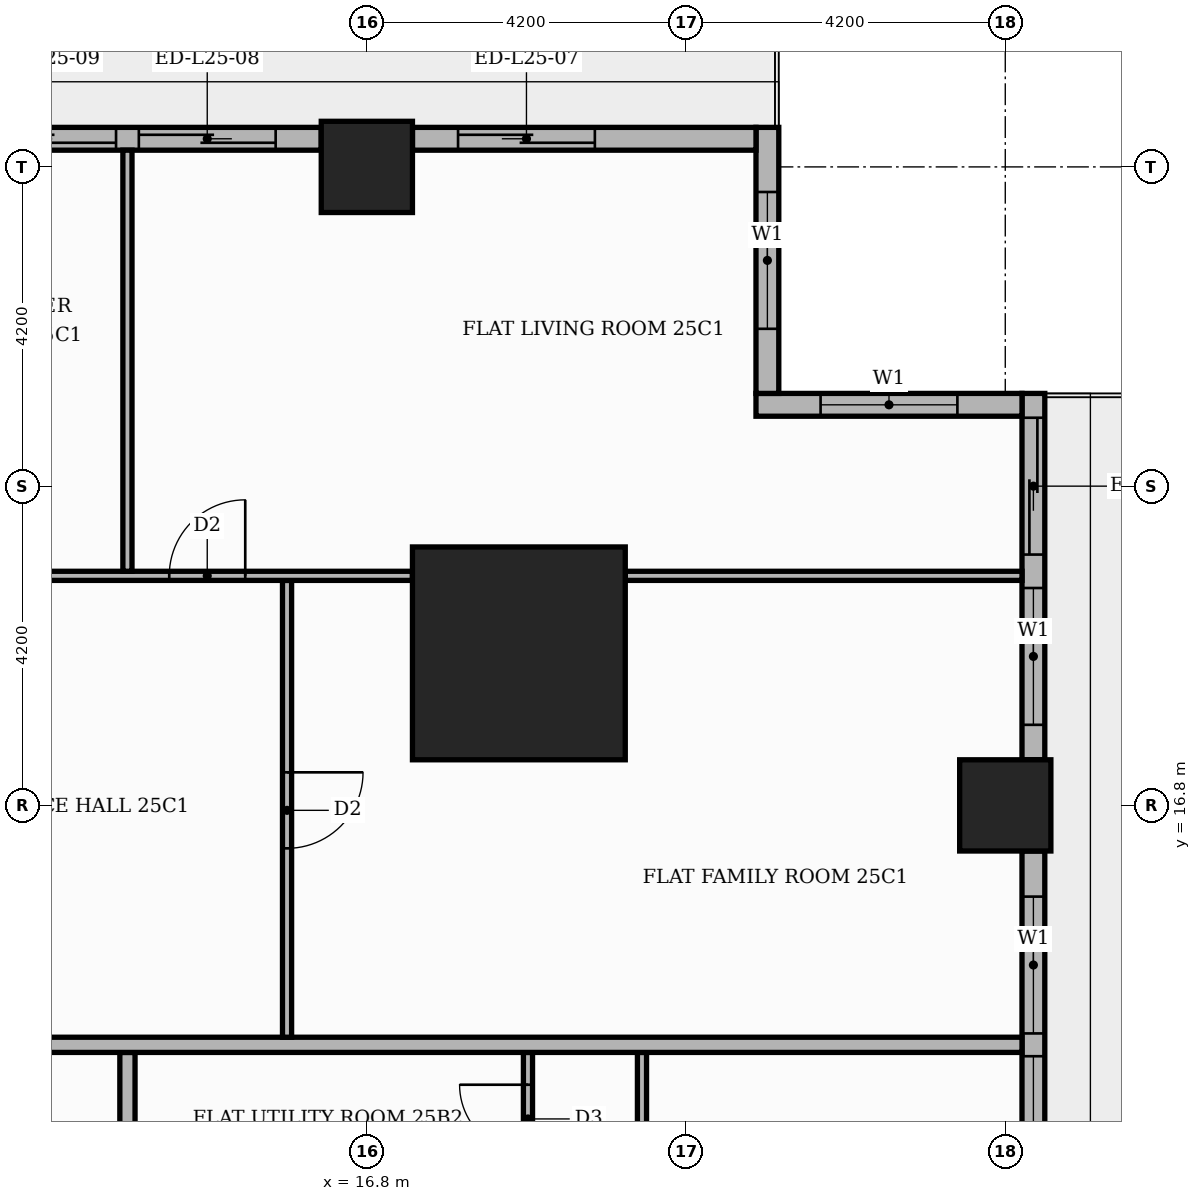
"""IFC4 building model, lengths in metres.
Left out: names, types, materials, properties, quantities, classifications, styles, units other than length and angle.
Written with IfcOpenShell. Run it as: python <this file> out.ifc"""

import sys

from ifc_helpers import new_model, si_unit, direction, frame, frame_2d, origin, origin_2d, place, context, subcontext, project, spatial, rectangle, extrude, element, fill, save


model = new_model("IFC4")
c1 = context("Model", 3, precision=1e-05, world=origin(), true_north=direction((0.0, 1.0)))
c2 = subcontext(c1, "Body", "Model", "MODEL_VIEW")
j1 = project(units=[si_unit("LENGTHUNIT", "METRE"), si_unit("PLANEANGLEUNIT", "RADIAN")], contexts=[c1])
p1 = place(None, origin())
s1 = spatial("IfcSite", under=j1, at=p1, CompositionType="ELEMENT")
p2 = place(p1, origin())
s2 = spatial("IfcBuilding", under=s1, at=p2, CompositionType="ELEMENT")
p3 = place(p2, frame((0.0, 0.0, 106.5)))
s3 = spatial("IfcBuildingStorey", under=s2, at=p3, CompositionType="ELEMENT", Elevation=106.5)
p4 = place(p3, frame((18.8, 18.8, 0.0), z_axis=(0.0, 0.0, 1.0), x_axis=(1.0, 0.0, 0.0)))
e1 = element("IfcColumn", 1, at=p4, inside=s3, PredefinedType="COLUMN", context=c2, shape_type="SweptSolid", body=[
    extrude(rectangle(XDim=2.8, YDim=2.8, at=origin_2d()), origin(), (0.0, 0.0, 1.0), 3.9),
])
for number, where, z_axis, x_axis in (
    (2, (25.2, 16.8, 0.0), (0.0, 0.0, 1.0), (1.0, 0.0, 0.0)),
    (3, (16.8, 25.2, 0.0), (0.0, 0.0, 1.0), (1.0, 0.0, 0.0)),
):
    element("IfcColumn", number, at=place(p3, frame(where, z_axis=z_axis, x_axis=x_axis)), inside=s3, PredefinedType="COLUMN", context=c2, shape_type="SweptSolid", body=[
        extrude(rectangle(XDim=1.2, YDim=1.2, at=origin_2d()), origin(), (0.0, 0.0, 1.0), 3.9),
    ])
p5 = place(p3, frame((25.57, 9.0, 0.0), z_axis=(0.0, 0.0, 1.0), x_axis=(0.0, 1.0, 0.0)))
e4 = element("IfcWall", 4, at=p5, inside=s3, PredefinedType="STANDARD", context=c2, shape_type="SweptSolid", body=[
    extrude(rectangle(XDim=7.2, YDim=0.3, at=frame_2d((3.6, 0.0))), origin(), (0.0, 0.0, 1.0), 3.48),
])
p6 = place(p5, frame((0.6, 0.0, 0.9)))
e5 = element("IfcOpeningElement", 5, at=p6, cuts=e4, PredefinedType="OPENING", context=c2, shape_type="SweptSolid", body=[
    extrude(rectangle(XDim=3.9, YDim=2.1, at=frame_2d((1.95, 1.05))), frame((0.0, 0.16, 0.0), z_axis=(0.0, -1.0, 0.0), x_axis=(1.0, 0.0, 0.0)), (0.0, 0.0, 1.0), 0.32),
])
p7 = place(p5, frame((4.8, 0.0, 0.9)))
e6 = element("IfcOpeningElement", 6, at=p7, cuts=e4, PredefinedType="OPENING", context=c2, shape_type="SweptSolid", body=[
    extrude(rectangle(XDim=1.8, YDim=2.1, at=frame_2d((0.9, 1.05))), frame((0.0, 0.16, 0.0), z_axis=(0.0, -1.0, 0.0), x_axis=(1.0, 0.0, 0.0)), (0.0, 0.0, 1.0), 0.32),
])
p8 = place(p3, frame((25.57, 17.4, 0.0), z_axis=(0.0, 0.0, 1.0), x_axis=(0.0, 1.0, 0.0)))
e7 = element("IfcWall", 7, at=p8, inside=s3, PredefinedType="STANDARD", context=c2, shape_type="SweptSolid", body=[
    extrude(rectangle(XDim=4.82, YDim=0.3, at=frame_2d((2.41, 0.0))), origin(), (0.0, 0.0, 1.0), 3.48),
])
p9 = place(p8, frame((2.7, 0.0, 0.0)))
e8 = element("IfcOpeningElement", 8, at=p9, cuts=e7, PredefinedType="OPENING", context=c2, shape_type="SweptSolid", body=[
    extrude(rectangle(XDim=1.8, YDim=2.4, at=frame_2d((0.9, 1.2))), frame((0.0, 0.16, 0.0), z_axis=(0.0, -1.0, 0.0), x_axis=(1.0, 0.0, 0.0)), (0.0, 0.0, 1.0), 0.32),
])
p10 = place(p8, frame((0.46, 0.0, 0.9)))
e9 = element("IfcOpeningElement", 9, at=p10, cuts=e7, PredefinedType="OPENING", context=c2, shape_type="SweptSolid", body=[
    extrude(rectangle(XDim=1.8, YDim=2.1, at=frame_2d((0.9, 1.05))), frame((0.0, 0.16, 0.0), z_axis=(0.0, -1.0, 0.0), x_axis=(1.0, 0.0, 0.0)), (0.0, 0.0, 1.0), 0.32),
])
p11 = place(p3, frame((25.42, 22.07, 0.0), z_axis=(0.0, 0.0, 1.0), x_axis=(-1.0, 0.0, 0.0)))
e10 = element("IfcWall", 10, at=p11, inside=s3, PredefinedType="STANDARD", context=c2, shape_type="SweptSolid", body=[
    extrude(rectangle(XDim=3.5, YDim=0.3, at=frame_2d((1.75, 0.0))), origin(), (0.0, 0.0, 1.0), 3.48),
])
p12 = place(p11, frame((0.85, 0.0, 0.9)))
e11 = element("IfcOpeningElement", 11, at=p12, cuts=e10, PredefinedType="OPENING", context=c2, shape_type="SweptSolid", body=[
    extrude(rectangle(XDim=1.8, YDim=2.1, at=frame_2d((0.9, 1.05))), frame((0.0, 0.16, 0.0), z_axis=(0.0, -1.0, 0.0), x_axis=(1.0, 0.0, 0.0)), (0.0, 0.0, 1.0), 0.32),
])
p13 = place(p3, frame((22.07, 22.22, 0.0), z_axis=(0.0, 0.0, 1.0), x_axis=(0.0, 1.0, 0.0)))
e12 = element("IfcWall", 12, at=p13, inside=s3, PredefinedType="STANDARD", context=c2, shape_type="SweptSolid", body=[
    extrude(rectangle(XDim=3.5, YDim=0.3, at=frame_2d((1.75, 0.0))), origin(), (0.0, 0.0, 1.0), 3.48),
])
p14 = place(p13, frame((0.85, 0.0, 0.9)))
e13 = element("IfcOpeningElement", 13, at=p14, cuts=e12, PredefinedType="OPENING", context=c2, shape_type="SweptSolid", body=[
    extrude(rectangle(XDim=1.8, YDim=2.1, at=frame_2d((0.9, 1.05))), frame((0.0, 0.16, 0.0), z_axis=(0.0, -1.0, 0.0), x_axis=(1.0, 0.0, 0.0)), (0.0, 0.0, 1.0), 0.32),
])
p15 = place(p3, frame((21.92, 25.57, 0.0), z_axis=(0.0, 0.0, 1.0), x_axis=(-1.0, 0.0, 0.0)))
e14 = element("IfcWall", 14, at=p15, inside=s3, PredefinedType="STANDARD", context=c2, shape_type="SweptSolid", body=[
    extrude(rectangle(XDim=4.52, YDim=0.3, at=frame_2d((2.26, 0.0))), origin(), (0.0, 0.0, 1.0), 3.48),
])
p16 = place(p15, frame((2.12, 0.0, 0.0)))
e15 = element("IfcOpeningElement", 15, at=p16, cuts=e14, PredefinedType="OPENING", context=c2, shape_type="SweptSolid", body=[
    extrude(rectangle(XDim=1.8, YDim=2.4, at=frame_2d((0.9, 1.2))), frame((0.0, 0.16, 0.0), z_axis=(0.0, -1.0, 0.0), x_axis=(1.0, 0.0, 0.0)), (0.0, 0.0, 1.0), 0.32),
])
p17 = place(p3, frame((16.2, 25.57, 0.0), z_axis=(0.0, 0.0, 1.0), x_axis=(-1.0, 0.0, 0.0)))
e16 = element("IfcWall", 16, at=p17, inside=s3, PredefinedType="STANDARD", context=c2, shape_type="SweptSolid", body=[
    extrude(rectangle(XDim=7.2, YDim=0.3, at=frame_2d((3.6, 0.0))), origin(), (0.0, 0.0, 1.0), 3.48),
])
p18 = place(p17, frame((0.6, 0.0, 0.0)))
e17 = element("IfcOpeningElement", 17, at=p18, cuts=e16, PredefinedType="OPENING", context=c2, shape_type="SweptSolid", body=[
    extrude(rectangle(XDim=1.8, YDim=2.4, at=frame_2d((0.9, 1.2))), frame((0.0, 0.16, 0.0), z_axis=(0.0, -1.0, 0.0), x_axis=(1.0, 0.0, 0.0)), (0.0, 0.0, 1.0), 0.32),
])
p19 = place(p17, frame((2.7, 0.0, 0.0)))
e18 = element("IfcOpeningElement", 18, at=p19, cuts=e16, PredefinedType="OPENING", context=c2, shape_type="SweptSolid", body=[
    extrude(rectangle(XDim=1.8, YDim=2.4, at=frame_2d((0.9, 1.2))), frame((0.0, 0.16, 0.0), z_axis=(0.0, -1.0, 0.0), x_axis=(1.0, 0.0, 0.0)), (0.0, 0.0, 1.0), 0.32),
])
p20 = place(p17, frame((4.8, 0.0, 0.9)))
e19 = element("IfcOpeningElement", 19, at=p20, cuts=e16, PredefinedType="OPENING", context=c2, shape_type="SweptSolid", body=[
    extrude(rectangle(XDim=1.8, YDim=2.1, at=frame_2d((0.9, 1.05))), frame((0.0, 0.16, 0.0), z_axis=(0.0, -1.0, 0.0), x_axis=(1.0, 0.0, 0.0)), (0.0, 0.0, 1.0), 0.32),
])
p21 = place(p3, frame((13.65, -5.15, 0.0), z_axis=(0.0, 0.0, 1.0), x_axis=(0.0, 1.0, 0.0)))
e20 = element("IfcWall", 20, at=p21, inside=s3, PredefinedType="PARTITIONING", context=c2, shape_type="SweptSolid", body=[
    extrude(rectangle(XDim=18.7, YDim=0.2, at=frame_2d((9.35, 0.0))), origin(), (0.0, 0.0, 1.0), 3.48),
])
p22 = place(p21, frame((5.65, 0.0, 0.0)))
e21 = element("IfcOpeningElement", 21, at=p22, cuts=e20, PredefinedType="OPENING", context=c2, shape_type="SweptSolid", body=[
    extrude(rectangle(XDim=1.1, YDim=2.4, at=frame_2d((0.55, 1.2))), frame((0.0, 0.11, 0.0), z_axis=(0.0, -1.0, 0.0), x_axis=(1.0, 0.0, 0.0)), (0.0, 0.0, 1.0), 0.22),
])
p23 = place(p3, frame((20.42, 9.51, 0.0), z_axis=(0.0, 0.0, 1.0), x_axis=(0.0, 1.0, 0.0)))
e22 = element("IfcWall", 22, at=p23, inside=s3, PredefinedType="PARTITIONING", context=c2, shape_type="SweptSolid", body=[
    extrude(rectangle(XDim=4.04, YDim=0.12, at=frame_2d((2.02, 0.0))), origin(), (0.0, 0.0, 1.0), 3.48),
])
p24 = place(p23, frame((1.59, 0.0, 0.0)))
e23 = element("IfcOpeningElement", 23, at=p24, cuts=e22, PredefinedType="OPENING", context=c2, shape_type="SweptSolid", body=[
    extrude(rectangle(XDim=0.9, YDim=2.1, at=frame_2d((0.45, 1.05))), frame((0.0, 0.07, 0.0), z_axis=(0.0, -1.0, 0.0), x_axis=(1.0, 0.0, 0.0)), (0.0, 0.0, 1.0), 0.14),
])
p25 = place(p3, frame((18.92, 11.76, 0.0), z_axis=(0.0, 0.0, 1.0), x_axis=(0.0, 1.0, 0.0)))
e24 = element("IfcWall", 24, at=p25, inside=s3, PredefinedType="PARTITIONING", context=c2, shape_type="SweptSolid", body=[
    extrude(rectangle(XDim=1.79, YDim=0.12, at=frame_2d((0.895, 0.0))), origin(), (0.0, 0.0, 1.0), 3.48),
])
p26 = place(p25, frame((0.465, 0.0, 0.0)))
e25 = element("IfcOpeningElement", 25, at=p26, cuts=e24, PredefinedType="OPENING", context=c2, shape_type="SweptSolid", body=[
    extrude(rectangle(XDim=0.9, YDim=2.1, at=frame_2d((0.45, 1.05))), frame((0.0, 0.07, 0.0), z_axis=(0.0, -1.0, 0.0), x_axis=(1.0, 0.0, 0.0)), (0.0, 0.0, 1.0), 0.14),
])
p27 = place(p3, frame((-13.65, 13.65, 0.0), z_axis=(0.0, 0.0, 1.0), x_axis=(1.0, 0.0, 0.0)))
e26 = element("IfcWall", 26, at=p27, inside=s3, PredefinedType="PARTITIONING", context=c2, shape_type="SweptSolid", body=[
    extrude(rectangle(XDim=39.07, YDim=0.2, at=frame_2d((19.535, 0.0))), origin(), (0.0, 0.0, 1.0), 3.48),
])
p28 = place(p27, frame((24.65, 0.0, 0.0)))
e27 = element("IfcOpeningElement", 27, at=p28, cuts=e26, PredefinedType="OPENING", context=c2, shape_type="SweptSolid", body=[
    extrude(rectangle(XDim=1.1, YDim=2.4, at=frame_2d((0.55, 1.2))), frame((0.0, 0.11, 0.0), z_axis=(0.0, -1.0, 0.0), x_axis=(1.0, 0.0, 0.0)), (0.0, 0.0, 1.0), 0.22),
])
p29 = place(p27, frame((14.15, 0.0, 0.0)))
e28 = element("IfcOpeningElement", 28, at=p29, cuts=e26, PredefinedType="OPENING", context=c2, shape_type="SweptSolid", body=[
    extrude(rectangle(XDim=1.1, YDim=2.4, at=frame_2d((0.55, 1.2))), frame((0.0, 0.11, 0.0), z_axis=(0.0, -1.0, 0.0), x_axis=(1.0, 0.0, 0.0)), (0.0, 0.0, 1.0), 0.22),
])
p30 = place(p3, frame((15.75, 13.75, 0.0), z_axis=(0.0, 0.0, 1.0), x_axis=(0.0, 1.0, 0.0)))
e29 = element("IfcWall", 29, at=p30, inside=s3, PredefinedType="PARTITIONING", context=c2, shape_type="SweptSolid", body=[
    extrude(rectangle(XDim=6.01, YDim=0.12, at=frame_2d((3.005, 0.0))), origin(), (0.0, 0.0, 1.0), 3.48),
])
p31 = place(p30, frame((2.485, 0.0, 0.0)))
e30 = element("IfcOpeningElement", 30, at=p31, cuts=e29, PredefinedType="OPENING", context=c2, shape_type="SweptSolid", body=[
    extrude(rectangle(XDim=1.0, YDim=2.1, at=frame_2d((0.5, 1.05))), frame((0.0, 0.07, 0.0), z_axis=(0.0, -1.0, 0.0), x_axis=(1.0, 0.0, 0.0)), (0.0, 0.0, 1.0), 0.14),
])
p32 = place(p3, frame((5.35, 19.82, 0.0), z_axis=(0.0, 0.0, 1.0), x_axis=(1.0, 0.0, 0.0)))
e31 = element("IfcWall", 31, at=p32, inside=s3, PredefinedType="PARTITIONING", context=c2, shape_type="SweptSolid", body=[
    extrude(rectangle(XDim=12.05, YDim=0.12, at=frame_2d((6.025, 0.0))), origin(), (0.0, 0.0, 1.0), 3.48),
])
p33 = place(p32, frame((8.85, 0.0, 0.0)))
e32 = element("IfcOpeningElement", 32, at=p33, cuts=e31, PredefinedType="OPENING", context=c2, shape_type="SweptSolid", body=[
    extrude(rectangle(XDim=1.0, YDim=2.1, at=frame_2d((0.5, 1.05))), frame((0.0, 0.07, 0.0), z_axis=(0.0, -1.0, 0.0), x_axis=(1.0, 0.0, 0.0)), (0.0, 0.0, 1.0), 0.14),
])
p34 = place(p32, frame((5.75, 0.0, 0.0)))
e33 = element("IfcOpeningElement", 33, at=p34, cuts=e31, PredefinedType="OPENING", context=c2, shape_type="SweptSolid", body=[
    extrude(rectangle(XDim=0.9, YDim=2.1, at=frame_2d((0.45, 1.05))), frame((0.0, 0.07, 0.0), z_axis=(0.0, -1.0, 0.0), x_axis=(1.0, 0.0, 0.0)), (0.0, 0.0, 1.0), 0.14),
])
p35 = place(p3, frame((20.2, 19.82, 0.0), z_axis=(0.0, 0.0, 1.0), x_axis=(1.0, 0.0, 0.0)))
e34 = element("IfcWall", 34, at=p35, inside=s3, PredefinedType="PARTITIONING", context=c2, shape_type="SweptSolid", body=[
    extrude(rectangle(XDim=5.22, YDim=0.12, at=frame_2d((2.61, 0.0))), origin(), (0.0, 0.0, 1.0), 3.48),
])
p36 = place(p3, frame((13.65, 19.88, 0.0), z_axis=(0.0, 0.0, 1.0), x_axis=(0.0, 1.0, 0.0)))
e35 = element("IfcWall", 35, at=p36, inside=s3, PredefinedType="PARTITIONING", context=c2, shape_type="SweptSolid", body=[
    extrude(rectangle(XDim=5.54, YDim=0.12, at=frame_2d((2.77, 0.0))), origin(), (0.0, 0.0, 1.0), 3.48),
])
p37 = place(p6, origin())
e36 = element("IfcWindow", 36, at=p37, inside=s3, PartitioningType="SINGLE_PANEL", PredefinedType="WINDOW", context=c2, shape_type="SweptSolid", body=[
    extrude(rectangle(XDim=3.9, YDim=2.1, at=frame_2d((1.95, 1.05))), frame((0.0, 0.03, 0.0), z_axis=(0.0, -1.0, 0.0), x_axis=(1.0, 0.0, 0.0)), (0.0, 0.0, 1.0), 0.06),
])
fill(e5, e36)
p38 = place(p7, origin())
e37 = element("IfcWindow", 37, at=p38, inside=s3, PartitioningType="SINGLE_PANEL", PredefinedType="WINDOW", context=c2, shape_type="SweptSolid", body=[
    extrude(rectangle(XDim=1.8, YDim=2.1, at=frame_2d((0.9, 1.05))), frame((0.0, 0.03, 0.0), z_axis=(0.0, -1.0, 0.0), x_axis=(1.0, 0.0, 0.0)), (0.0, 0.0, 1.0), 0.06),
])
fill(e6, e37)
p39 = place(p9, origin())
e38 = element("IfcDoor", 38, at=p39, inside=s3, OperationType="SLIDING_TO_LEFT", PredefinedType="DOOR", context=c2, shape_type="SweptSolid", body=[
    extrude(rectangle(XDim=1.8, YDim=2.4, at=frame_2d((0.9, 1.2))), frame((0.0, 0.025, 0.0), z_axis=(0.0, -1.0, 0.0), x_axis=(1.0, 0.0, 0.0)), (0.0, 0.0, 1.0), 0.05),
])
fill(e8, e38)
p40 = place(p10, origin())
e39 = element("IfcWindow", 39, at=p40, inside=s3, PartitioningType="SINGLE_PANEL", PredefinedType="WINDOW", context=c2, shape_type="SweptSolid", body=[
    extrude(rectangle(XDim=1.8, YDim=2.1, at=frame_2d((0.9, 1.05))), frame((0.0, 0.03, 0.0), z_axis=(0.0, -1.0, 0.0), x_axis=(1.0, 0.0, 0.0)), (0.0, 0.0, 1.0), 0.06),
])
fill(e9, e39)
p41 = place(p12, origin())
e40 = element("IfcWindow", 40, at=p41, inside=s3, PartitioningType="SINGLE_PANEL", PredefinedType="WINDOW", context=c2, shape_type="SweptSolid", body=[
    extrude(rectangle(XDim=1.8, YDim=2.1, at=frame_2d((0.9, 1.05))), frame((0.0, 0.03, 0.0), z_axis=(0.0, -1.0, 0.0), x_axis=(1.0, 0.0, 0.0)), (0.0, 0.0, 1.0), 0.06),
])
fill(e11, e40)
p42 = place(p14, origin())
e41 = element("IfcWindow", 41, at=p42, inside=s3, PartitioningType="SINGLE_PANEL", PredefinedType="WINDOW", context=c2, shape_type="SweptSolid", body=[
    extrude(rectangle(XDim=1.8, YDim=2.1, at=frame_2d((0.9, 1.05))), frame((0.0, 0.03, 0.0), z_axis=(0.0, -1.0, 0.0), x_axis=(1.0, 0.0, 0.0)), (0.0, 0.0, 1.0), 0.06),
])
fill(e13, e41)
p43 = place(p16, origin())
e42 = element("IfcDoor", 42, at=p43, inside=s3, OperationType="SLIDING_TO_RIGHT", PredefinedType="DOOR", context=c2, shape_type="SweptSolid", body=[
    extrude(rectangle(XDim=1.8, YDim=2.4, at=frame_2d((0.9, 1.2))), frame((0.0, 0.025, 0.0), z_axis=(0.0, -1.0, 0.0), x_axis=(1.0, 0.0, 0.0)), (0.0, 0.0, 1.0), 0.05),
])
fill(e15, e42)
p44 = place(p18, origin())
e43 = element("IfcDoor", 43, at=p44, inside=s3, OperationType="SLIDING_TO_LEFT", PredefinedType="DOOR", context=c2, shape_type="SweptSolid", body=[
    extrude(rectangle(XDim=1.8, YDim=2.4, at=frame_2d((0.9, 1.2))), frame((0.0, 0.025, 0.0), z_axis=(0.0, -1.0, 0.0), x_axis=(1.0, 0.0, 0.0)), (0.0, 0.0, 1.0), 0.05),
])
fill(e17, e43)
p45 = place(p19, origin())
e44 = element("IfcDoor", 44, at=p45, inside=s3, OperationType="SLIDING_TO_RIGHT", PredefinedType="DOOR", context=c2, shape_type="SweptSolid", body=[
    extrude(rectangle(XDim=1.8, YDim=2.4, at=frame_2d((0.9, 1.2))), frame((0.0, 0.025, 0.0), z_axis=(0.0, -1.0, 0.0), x_axis=(1.0, 0.0, 0.0)), (0.0, 0.0, 1.0), 0.05),
])
fill(e18, e44)
p46 = place(p26, origin())
e45 = element("IfcDoor", 45, at=p46, inside=s3, OperationType="SINGLE_SWING_RIGHT", PredefinedType="DOOR", context=c2, shape_type="SweptSolid", body=[
    extrude(rectangle(XDim=0.9, YDim=2.1, at=frame_2d((0.45, 1.05))), frame((0.0, 0.025, 0.0), z_axis=(0.0, -1.0, 0.0), x_axis=(1.0, 0.0, 0.0)), (0.0, 0.0, 1.0), 0.05),
])
fill(e25, e45)
p47 = place(p31, frame((1.0, 0.0, 0.0), z_axis=(0.0, 0.0, 1.0), x_axis=(-1.0, 0.0, 0.0)))
e46 = element("IfcDoor", 46, at=p47, inside=s3, OperationType="SINGLE_SWING_RIGHT", PredefinedType="DOOR", context=c2, shape_type="SweptSolid", body=[
    extrude(rectangle(XDim=1.0, YDim=2.1, at=frame_2d((0.5, 1.05))), frame((0.0, 0.025, 0.0), z_axis=(0.0, -1.0, 0.0), x_axis=(1.0, 0.0, 0.0)), (0.0, 0.0, 1.0), 0.05),
])
fill(e30, e46)
p48 = place(p33, origin())
e47 = element("IfcDoor", 47, at=p48, inside=s3, OperationType="SINGLE_SWING_RIGHT", PredefinedType="DOOR", context=c2, shape_type="SweptSolid", body=[
    extrude(rectangle(XDim=1.0, YDim=2.1, at=frame_2d((0.5, 1.05))), frame((0.0, 0.025, 0.0), z_axis=(0.0, -1.0, 0.0), x_axis=(1.0, 0.0, 0.0)), (0.0, 0.0, 1.0), 0.05),
])
fill(e32, e47)
save(model, sys.argv[1])
